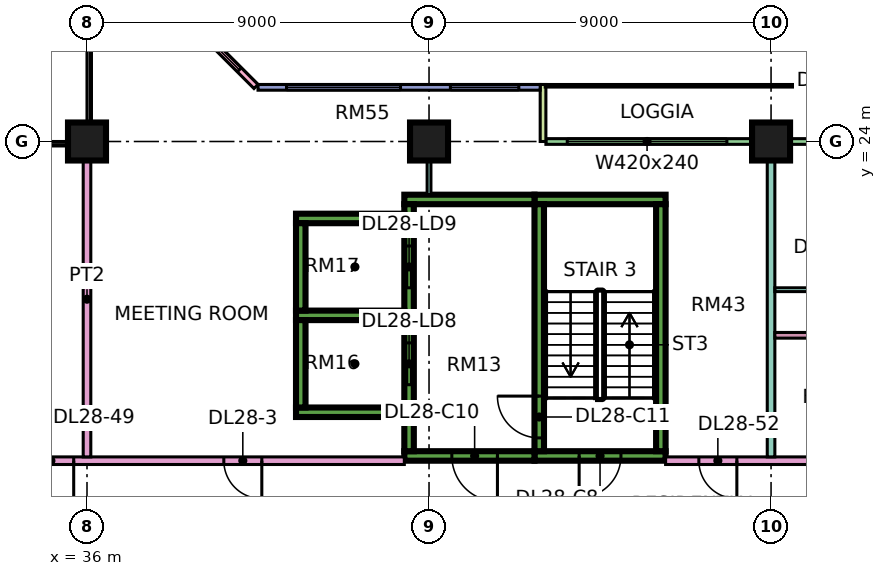
"""IFC4 building model, lengths in metres.
Left out: names, types, materials, properties, quantities, classifications, styles, units other than length and angle.
Written with IfcOpenShell. Run it as: python <this file> out.ifc"""

import sys

from ifc_helpers import new_model, si_unit, direction, frame, frame_2d, origin, origin_2d, place, context, subcontext, project, spatial, rectangle, extrude, element, fill, save


model = new_model("IFC4")
c1 = context("Model", 3, precision=1e-05, world=origin(), true_north=direction((0.0, 1.0)))
c2 = subcontext(c1, "Body", "Model", "MODEL_VIEW")
j1 = project(units=[si_unit("LENGTHUNIT", "METRE"), si_unit("PLANEANGLEUNIT", "RADIAN")], contexts=[c1])
p1 = place(None, origin())
s1 = spatial("IfcSite", under=j1, at=p1, CompositionType="ELEMENT")
p2 = place(p1, origin())
s2 = spatial("IfcBuilding", under=s1, at=p2, CompositionType="ELEMENT")
p3 = place(p2, frame((0.0, 0.0, 121.9)))
s3 = spatial("IfcBuildingStorey", under=s2, at=p3, CompositionType="ELEMENT", Elevation=121.9)
for number, where, z_axis, x_axis in (
    (1, (36.0, 24.0, 0.0), (0.0, 0.0, 1.0), (1.0, 0.0, 0.0)),
    (2, (45.0, 24.0, 0.0), (0.0, 0.0, 1.0), (1.0, 0.0, 0.0)),
    (3, (54.0, 24.0, 0.0), (0.0, 0.0, 1.0), (1.0, 0.0, 0.0)),
):
    element("IfcColumn", number, at=place(p3, frame(where, z_axis=z_axis, x_axis=x_axis)), inside=s3, PredefinedType="COLUMN", context=c2, shape_type="SweptSolid", body=[
        extrude(rectangle(XDim=1.0, YDim=1.0, at=origin_2d()), origin(), (0.0, 0.0, 1.0), 3.75),
    ])
p4 = place(p3, frame((47.775, 15.725, 0.0), z_axis=(0.0, 0.0, 1.0), x_axis=(1.0, 0.0, 0.0)))
e4 = element("IfcWall", 4, at=p4, inside=s3, PredefinedType="SHEAR", context=c2, shape_type="SweptSolid", body=[
    extrude(rectangle(XDim=3.45, YDim=0.25, at=frame_2d((1.725, 0.0))), origin(), (0.0, 0.0, 1.0), 3.75),
])
p5 = place(p4, frame((1.175, 0.0, 0.0)))
e5 = element("IfcOpeningElement", 5, at=p5, cuts=e4, PredefinedType="OPENING", context=c2, shape_type="SweptSolid", body=[
    extrude(rectangle(XDim=1.1, YDim=2.2, at=frame_2d((0.55, 1.1))), frame((0.0, 0.135, 0.0), z_axis=(0.0, -1.0, 0.0), x_axis=(1.0, 0.0, 0.0)), (0.0, 0.0, 1.0), 0.27),
])
p6 = place(p3, frame((47.775, 22.475, 0.0), z_axis=(0.0, 0.0, 1.0), x_axis=(1.0, 0.0, 0.0)))
e6 = element("IfcWall", 6, at=p6, inside=s3, PredefinedType="SHEAR", context=c2, shape_type="SweptSolid", body=[
    extrude(rectangle(XDim=3.45, YDim=0.25, at=frame_2d((1.725, 0.0))), origin(), (0.0, 0.0, 1.0), 3.75),
])
p7 = place(p3, frame((47.9, 15.85, 0.0), z_axis=(0.0, 0.0, 1.0), x_axis=(0.0, 1.0, 0.0)))
e7 = element("IfcWall", 7, at=p7, inside=s3, PredefinedType="SHEAR", context=c2, shape_type="SweptSolid", body=[
    extrude(rectangle(XDim=6.5, YDim=0.25, at=frame_2d((3.25, 0.0))), origin(), (0.0, 0.0, 1.0), 3.75),
])
p8 = place(p7, frame((0.35, 0.0, 0.0)))
e8 = element("IfcOpeningElement", 8, at=p8, cuts=e7, PredefinedType="OPENING", context=c2, shape_type="SweptSolid", body=[
    extrude(rectangle(XDim=1.1, YDim=2.2, at=frame_2d((0.55, 1.1))), frame((0.0, 0.135, 0.0), z_axis=(0.0, -1.0, 0.0), x_axis=(1.0, 0.0, 0.0)), (0.0, 0.0, 1.0), 0.27),
])
p9 = place(p3, frame((51.1, 15.85, 0.0), z_axis=(0.0, 0.0, 1.0), x_axis=(0.0, 1.0, 0.0)))
e9 = element("IfcWall", 9, at=p9, inside=s3, PredefinedType="SHEAR", context=c2, shape_type="SweptSolid", body=[
    extrude(rectangle(XDim=6.5, YDim=0.25, at=frame_2d((3.25, 0.0))), origin(), (0.0, 0.0, 1.0), 3.75),
])
p10 = place(p3, frame((44.35, 15.725, 0.0), z_axis=(0.0, 0.0, 1.0), x_axis=(1.0, 0.0, 0.0)))
e10 = element("IfcWall", 10, at=p10, inside=s3, PredefinedType="SHEAR", context=c2, shape_type="SweptSolid", body=[
    extrude(rectangle(XDim=3.425, YDim=0.25, at=frame_2d((1.712, 0.0))), origin(), (0.0, 0.0, 1.0), 3.75),
])
p11 = place(p10, frame((1.25, 0.0, 0.0)))
e11 = element("IfcOpeningElement", 11, at=p11, cuts=e10, PredefinedType="OPENING", context=c2, shape_type="SweptSolid", body=[
    extrude(rectangle(XDim=1.2, YDim=2.2, at=frame_2d((0.6, 1.1))), frame((0.0, 0.135, 0.0), z_axis=(0.0, -1.0, 0.0), x_axis=(1.0, 0.0, 0.0)), (0.0, 0.0, 1.0), 0.27),
])
p12 = place(p3, frame((44.35, 22.475, 0.0), z_axis=(0.0, 0.0, 1.0), x_axis=(1.0, 0.0, 0.0)))
e12 = element("IfcWall", 12, at=p12, inside=s3, PredefinedType="SHEAR", context=c2, shape_type="SweptSolid", body=[
    extrude(rectangle(XDim=3.425, YDim=0.25, at=frame_2d((1.712, 0.0))), origin(), (0.0, 0.0, 1.0), 3.75),
])
p13 = place(p3, frame((44.475, 15.85, 0.0), z_axis=(0.0, 0.0, 1.0), x_axis=(0.0, 1.0, 0.0)))
e13 = element("IfcWall", 13, at=p13, inside=s3, PredefinedType="SHEAR", context=c2, shape_type="SweptSolid", body=[
    extrude(rectangle(XDim=6.5, YDim=0.25, at=frame_2d((3.25, 0.0))), origin(), (0.0, 0.0, 1.0), 3.75),
])
p14 = place(p13, frame((1.75, 0.0, 0.0)))
e14 = element("IfcOpeningElement", 14, at=p14, cuts=e13, PredefinedType="OPENING", context=c2, shape_type="SweptSolid", body=[
    extrude(rectangle(XDim=1.1, YDim=2.2, at=frame_2d((0.55, 1.1))), frame((0.0, 0.135, 0.0), z_axis=(0.0, -1.0, 0.0), x_axis=(1.0, 0.0, 0.0)), (0.0, 0.0, 1.0), 0.27),
])
p15 = place(p13, frame((4.3, 0.0, 0.0)))
e15 = element("IfcOpeningElement", 15, at=p15, cuts=e13, PredefinedType="OPENING", context=c2, shape_type="SweptSolid", body=[
    extrude(rectangle(XDim=1.1, YDim=2.2, at=frame_2d((0.55, 1.1))), frame((0.0, 0.135, 0.0), z_axis=(0.0, -1.0, 0.0), x_axis=(1.0, 0.0, 0.0)), (0.0, 0.0, 1.0), 0.27),
])
for number, where, z_axis, x_axis in (
    (16, (41.5, 16.875, 0.0), (0.0, 0.0, 1.0), (1.0, 0.0, 0.0)),
    (17, (41.5, 19.425, 0.0), (0.0, 0.0, 1.0), (1.0, 0.0, 0.0)),
    (18, (41.5, 21.975, 0.0), (0.0, 0.0, 1.0), (1.0, 0.0, 0.0)),
):
    element("IfcWall", number, at=place(p3, frame(where, z_axis=z_axis, x_axis=x_axis)), inside=s3, PredefinedType="SHEAR", context=c2, shape_type="SweptSolid", body=[
        extrude(rectangle(XDim=2.85, YDim=0.25, at=frame_2d((1.425, 0.0))), origin(), (0.0, 0.0, 1.0), 3.75),
    ])
for number, where, z_axis, x_axis in (
    (19, (41.625, 17.0, 0.0), (0.0, 0.0, 1.0), (0.0, 1.0, 0.0)),
    (20, (41.625, 19.55, 0.0), (0.0, 0.0, 1.0), (0.0, 1.0, 0.0)),
):
    element("IfcWall", number, at=place(p3, frame(where, z_axis=z_axis, x_axis=x_axis)), inside=s3, PredefinedType="SHEAR", context=c2, shape_type="SweptSolid", body=[
        extrude(rectangle(XDim=2.3, YDim=0.25, at=frame_2d((1.15, 0.0))), origin(), (0.0, 0.0, 1.0), 3.75),
    ])
p16 = place(p3, frame((59.925, 24.0, 0.0), z_axis=(0.0, 0.0, 1.0), x_axis=(-1.0, 0.0, 0.0)))
e21 = element("IfcWall", 21, at=p16, inside=s3, PredefinedType="SOLIDWALL", context=c2, shape_type="SweptSolid", body=[
    extrude(rectangle(XDim=11.85, YDim=0.15, at=frame_2d((5.925, 0.0))), origin(), (0.0, 0.0, 1.0), 3.35),
])
p17 = place(p16, frame((0.562, 0.0, 0.45)))
e22 = element("IfcOpeningElement", 22, at=p17, cuts=e21, PredefinedType="OPENING", context=c2, shape_type="SweptSolid", body=[
    extrude(rectangle(XDim=1.8, YDim=2.4, at=frame_2d((0.9, 1.2))), frame((0.0, 0.085, 0.0), z_axis=(0.0, -1.0, 0.0), x_axis=(1.0, 0.0, 0.0)), (0.0, 0.0, 1.0), 0.17),
])
p18 = place(p16, frame((3.525, 0.0, 0.0)))
e23 = element("IfcOpeningElement", 23, at=p18, cuts=e21, PredefinedType="OPENING", context=c2, shape_type="SweptSolid", body=[
    extrude(rectangle(XDim=1.2, YDim=2.4, at=frame_2d((0.6, 1.2))), frame((0.0, 0.085, 0.0), z_axis=(0.0, -1.0, 0.0), x_axis=(1.0, 0.0, 0.0)), (0.0, 0.0, 1.0), 0.17),
])
p19 = place(p16, frame((7.087, 0.0, 0.45)))
e24 = element("IfcOpeningElement", 24, at=p19, cuts=e21, PredefinedType="OPENING", context=c2, shape_type="SweptSolid", body=[
    extrude(rectangle(XDim=4.2, YDim=2.4, at=frame_2d((2.1, 1.2))), frame((0.0, 0.085, 0.0), z_axis=(0.0, -1.0, 0.0), x_axis=(1.0, 0.0, 0.0)), (0.0, 0.0, 1.0), 0.17),
])
p20 = place(p3, frame((48.0, 25.5, 0.0), z_axis=(0.0, 0.0, 1.0), x_axis=(0.0, -1.0, 0.0)))
e25 = element("IfcWall", 25, at=p20, inside=s3, PredefinedType="SOLIDWALL", context=c2, shape_type="SweptSolid", body=[
    extrude(rectangle(XDim=1.5, YDim=0.15, at=frame_2d((0.75, 0.0))), origin(), (0.0, 0.0, 1.0), 3.35),
])
p21 = place(p3, frame((47.925, 25.425, 0.0), z_axis=(0.0, 0.0, 1.0), x_axis=(-1.0, 0.0, 0.0)))
e26 = element("IfcWall", 26, at=p21, inside=s3, PredefinedType="SOLIDWALL", context=c2, shape_type="SweptSolid", body=[
    extrude(rectangle(XDim=7.425, YDim=0.15, at=frame_2d((3.712, 0.0))), origin(), (0.0, 0.0, 1.0), 3.35),
])
p22 = place(p21, frame((0.562, 0.0, 0.45)))
e27 = element("IfcOpeningElement", 27, at=p22, cuts=e26, PredefinedType="OPENING", context=c2, shape_type="SweptSolid", body=[
    extrude(rectangle(XDim=1.8, YDim=2.4, at=frame_2d((0.9, 1.2))), frame((0.0, 0.085, 0.0), z_axis=(0.0, -1.0, 0.0), x_axis=(1.0, 0.0, 0.0)), (0.0, 0.0, 1.0), 0.17),
])
p23 = place(p21, frame((3.675, 0.0, 0.45)))
e28 = element("IfcOpeningElement", 28, at=p23, cuts=e26, PredefinedType="OPENING", context=c2, shape_type="SweptSolid", body=[
    extrude(rectangle(XDim=3.0, YDim=2.4, at=frame_2d((1.5, 1.2))), frame((0.0, 0.085, 0.0), z_axis=(0.0, -1.0, 0.0), x_axis=(1.0, 0.0, 0.0)), (0.0, 0.0, 1.0), 0.17),
])
p24 = place(p3, frame((40.447, 25.447, 0.0), z_axis=(0.0, 0.0, 1.0), x_axis=(-0.707106781187, 0.707106781187, 0.0)))
e29 = element("IfcWall", 29, at=p24, inside=s3, PredefinedType="SOLIDWALL", context=c2, shape_type="SweptSolid", body=[
    extrude(rectangle(XDim=4.243, YDim=0.15, at=frame_2d((2.121, 0.0))), origin(), (0.0, 0.0, 1.0), 3.35),
])
p25 = place(p24, frame((0.621, 0.0, 0.45)))
e30 = element("IfcOpeningElement", 30, at=p25, cuts=e29, PredefinedType="OPENING", context=c2, shape_type="SweptSolid", body=[
    extrude(rectangle(XDim=3.0, YDim=2.4, at=frame_2d((1.5, 1.2))), frame((0.0, 0.085, 0.0), z_axis=(0.0, -1.0, 0.0), x_axis=(1.0, 0.0, 0.0)), (0.0, 0.0, 1.0), 0.17),
])
p26 = place(p3, frame((34.0, 15.6, 0.0), z_axis=(0.0, 0.0, 1.0), x_axis=(1.0, 0.0, 0.0)))
e31 = element("IfcWall", 31, at=p26, inside=s3, PredefinedType="PARTITIONING", context=c2, shape_type="SweptSolid", body=[
    extrude(rectangle(XDim=10.35, YDim=0.2, at=frame_2d((5.175, 0.0))), origin(), (0.0, 0.0, 1.0), 3.35),
])
p27 = place(p26, frame((5.6, 0.0, 0.0)))
e32 = element("IfcOpeningElement", 32, at=p27, cuts=e31, PredefinedType="OPENING", context=c2, shape_type="SweptSolid", body=[
    extrude(rectangle(XDim=1.0, YDim=2.1, at=frame_2d((0.5, 1.05))), frame((0.0, 0.11, 0.0), z_axis=(0.0, -1.0, 0.0), x_axis=(1.0, 0.0, 0.0)), (0.0, 0.0, 1.0), 0.22),
])
p28 = place(p26, frame((0.45, 0.0, 0.0)))
e33 = element("IfcOpeningElement", 33, at=p28, cuts=e31, PredefinedType="OPENING", context=c2, shape_type="SweptSolid", body=[
    extrude(rectangle(XDim=1.2, YDim=2.1, at=frame_2d((0.6, 1.05))), frame((0.0, 0.11, 0.0), z_axis=(0.0, -1.0, 0.0), x_axis=(1.0, 0.0, 0.0)), (0.0, 0.0, 1.0), 0.22),
])
p29 = place(p3, frame((36.0, 15.7, 0.0), z_axis=(0.0, 0.0, 1.0), x_axis=(0.0, 1.0, 0.0)))
e34 = element("IfcWall", 34, at=p29, inside=s3, PredefinedType="PARTITIONING", context=c2, shape_type="SweptSolid", body=[
    extrude(rectangle(XDim=8.3, YDim=0.2, at=frame_2d((4.15, 0.0))), origin(), (0.0, 0.0, 1.0), 3.35),
])
p30 = place(p3, frame((45.0, 22.6, 0.0), z_axis=(0.0, 0.0, 1.0), x_axis=(0.0, 1.0, 0.0)))
e35 = element("IfcWall", 35, at=p30, inside=s3, PredefinedType="PARTITIONING", context=c2, shape_type="SweptSolid", body=[
    extrude(rectangle(XDim=1.4, YDim=0.1, at=frame_2d((0.7, 0.0))), origin(), (0.0, 0.0, 1.0), 3.35),
])
p31 = place(p3, frame((51.225, 15.6, 0.0), z_axis=(0.0, 0.0, 1.0), x_axis=(1.0, 0.0, 0.0)))
e36 = element("IfcWall", 36, at=p31, inside=s3, PredefinedType="PARTITIONING", context=c2, shape_type="SweptSolid", body=[
    extrude(rectangle(XDim=22.125, YDim=0.2, at=frame_2d((11.062, 0.0))), origin(), (0.0, 0.0, 1.0), 3.35),
])
p32 = place(p31, frame((18.725, 0.0, 0.0)))
e37 = element("IfcOpeningElement", 37, at=p32, cuts=e36, PredefinedType="OPENING", context=c2, shape_type="SweptSolid", body=[
    extrude(rectangle(XDim=1.0, YDim=2.1, at=frame_2d((0.5, 1.05))), frame((0.0, 0.11, 0.0), z_axis=(0.0, -1.0, 0.0), x_axis=(1.0, 0.0, 0.0)), (0.0, 0.0, 1.0), 0.22),
])
p33 = place(p31, frame((0.875, 0.0, 0.0)))
e38 = element("IfcOpeningElement", 38, at=p33, cuts=e36, PredefinedType="OPENING", context=c2, shape_type="SweptSolid", body=[
    extrude(rectangle(XDim=1.0, YDim=2.1, at=frame_2d((0.5, 1.05))), frame((0.0, 0.11, 0.0), z_axis=(0.0, -1.0, 0.0), x_axis=(1.0, 0.0, 0.0)), (0.0, 0.0, 1.0), 0.22),
])
p34 = place(p3, frame((54.0, 15.7, 0.0), z_axis=(0.0, 0.0, 1.0), x_axis=(0.0, 1.0, 0.0)))
e39 = element("IfcWall", 39, at=p34, inside=s3, PredefinedType="PARTITIONING", context=c2, shape_type="SweptSolid", body=[
    extrude(rectangle(XDim=8.226, YDim=0.2, at=frame_2d((4.113, 0.0))), origin(), (0.0, 0.0, 1.0), 3.35),
])
p35 = place(p3, frame((54.1, 18.9, 0.0), z_axis=(0.0, 0.0, 1.0), x_axis=(1.0, 0.0, 0.0)))
e40 = element("IfcWall", 40, at=p35, inside=s3, PredefinedType="PARTITIONING", context=c2, shape_type="SweptSolid", body=[
    extrude(rectangle(XDim=14.975, YDim=0.15, at=frame_2d((7.487, 0.0))), origin(), (0.0, 0.0, 1.0), 3.35),
])
p36 = place(p35, frame((2.3, 0.0, 0.0)))
e41 = element("IfcOpeningElement", 41, at=p36, cuts=e40, PredefinedType="OPENING", context=c2, shape_type="SweptSolid", body=[
    extrude(rectangle(XDim=0.9, YDim=2.1, at=frame_2d((0.45, 1.05))), frame((0.0, 0.085, 0.0), z_axis=(0.0, -1.0, 0.0), x_axis=(1.0, 0.0, 0.0)), (0.0, 0.0, 1.0), 0.17),
])
p37 = place(p35, frame((7.1, 0.0, 0.0)))
e42 = element("IfcOpeningElement", 42, at=p37, cuts=e40, PredefinedType="OPENING", context=c2, shape_type="SweptSolid", body=[
    extrude(rectangle(XDim=0.8, YDim=2.1, at=frame_2d((0.4, 1.05))), frame((0.0, 0.085, 0.0), z_axis=(0.0, -1.0, 0.0), x_axis=(1.0, 0.0, 0.0)), (0.0, 0.0, 1.0), 0.17),
])
p38 = place(p35, frame((10.55, 0.0, 0.0)))
e43 = element("IfcOpeningElement", 43, at=p38, cuts=e40, PredefinedType="OPENING", context=c2, shape_type="SweptSolid", body=[
    extrude(rectangle(XDim=0.8, YDim=2.1, at=frame_2d((0.4, 1.05))), frame((0.0, 0.085, 0.0), z_axis=(0.0, -1.0, 0.0), x_axis=(1.0, 0.0, 0.0)), (0.0, 0.0, 1.0), 0.17),
])
p39 = place(p3, frame((54.1, 20.1, 0.0), z_axis=(0.0, 0.0, 1.0), x_axis=(1.0, 0.0, 0.0)))
e44 = element("IfcWall", 44, at=p39, inside=s3, PredefinedType="PARTITIONING", context=c2, shape_type="SweptSolid", body=[
    extrude(rectangle(XDim=11.95, YDim=0.1, at=frame_2d((5.975, 0.0))), origin(), (0.0, 0.0, 1.0), 3.35),
])
p40 = place(p39, frame((0.95, 0.0, 0.0)))
e45 = element("IfcOpeningElement", 45, at=p40, cuts=e44, PredefinedType="OPENING", context=c2, shape_type="SweptSolid", body=[
    extrude(rectangle(XDim=0.9, YDim=2.1, at=frame_2d((0.45, 1.05))), frame((0.0, 0.06, 0.0), z_axis=(0.0, -1.0, 0.0), x_axis=(1.0, 0.0, 0.0)), (0.0, 0.0, 1.0), 0.12),
])
p41 = place(p39, frame((3.95, 0.0, 0.0)))
e46 = element("IfcOpeningElement", 46, at=p41, cuts=e44, PredefinedType="OPENING", context=c2, shape_type="SweptSolid", body=[
    extrude(rectangle(XDim=0.9, YDim=2.1, at=frame_2d((0.45, 1.05))), frame((0.0, 0.06, 0.0), z_axis=(0.0, -1.0, 0.0), x_axis=(1.0, 0.0, 0.0)), (0.0, 0.0, 1.0), 0.12),
])
p42 = place(p39, frame((6.55, 0.0, 0.0)))
e47 = element("IfcOpeningElement", 47, at=p42, cuts=e44, PredefinedType="OPENING", context=c2, shape_type="SweptSolid", body=[
    extrude(rectangle(XDim=1.6, YDim=2.1, at=frame_2d((0.8, 1.05))), frame((0.0, 0.06, 0.0), z_axis=(0.0, -1.0, 0.0), x_axis=(1.0, 0.0, 0.0)), (0.0, 0.0, 1.0), 0.12),
])
p43 = place(p39, frame((9.95, 0.0, 0.0)))
e48 = element("IfcOpeningElement", 48, at=p43, cuts=e44, PredefinedType="OPENING", context=c2, shape_type="SweptSolid", body=[
    extrude(rectangle(XDim=0.9, YDim=2.1, at=frame_2d((0.45, 1.05))), frame((0.0, 0.06, 0.0), z_axis=(0.0, -1.0, 0.0), x_axis=(1.0, 0.0, 0.0)), (0.0, 0.0, 1.0), 0.12),
])
p44 = place(p19, origin())
e49 = element("IfcWindow", 49, at=p44, inside=s3, PartitioningType="SINGLE_PANEL", PredefinedType="WINDOW", context=c2, shape_type="SweptSolid", body=[
    extrude(rectangle(XDim=4.2, YDim=2.4, at=frame_2d((2.1, 1.2))), frame((0.0, 0.03, 0.0), z_axis=(0.0, -1.0, 0.0), x_axis=(1.0, 0.0, 0.0)), (0.0, 0.0, 1.0), 0.06),
])
fill(e24, e49)
p45 = place(p22, origin())
e50 = element("IfcWindow", 50, at=p45, inside=s3, PartitioningType="SINGLE_PANEL", PredefinedType="WINDOW", context=c2, shape_type="SweptSolid", body=[
    extrude(rectangle(XDim=1.8, YDim=2.4, at=frame_2d((0.9, 1.2))), frame((0.0, 0.03, 0.0), z_axis=(0.0, -1.0, 0.0), x_axis=(1.0, 0.0, 0.0)), (0.0, 0.0, 1.0), 0.06),
])
fill(e27, e50)
p46 = place(p23, origin())
e51 = element("IfcWindow", 51, at=p46, inside=s3, PartitioningType="SINGLE_PANEL", PredefinedType="WINDOW", context=c2, shape_type="SweptSolid", body=[
    extrude(rectangle(XDim=3.0, YDim=2.4, at=frame_2d((1.5, 1.2))), frame((0.0, 0.03, 0.0), z_axis=(0.0, -1.0, 0.0), x_axis=(1.0, 0.0, 0.0)), (0.0, 0.0, 1.0), 0.06),
])
fill(e28, e51)
p47 = place(p25, origin())
e52 = element("IfcWindow", 52, at=p47, inside=s3, PartitioningType="SINGLE_PANEL", PredefinedType="WINDOW", context=c2, shape_type="SweptSolid", body=[
    extrude(rectangle(XDim=3.0, YDim=2.4, at=frame_2d((1.5, 1.2))), frame((0.0, 0.03, 0.0), z_axis=(0.0, -1.0, 0.0), x_axis=(1.0, 0.0, 0.0)), (0.0, 0.0, 1.0), 0.06),
])
fill(e30, e52)
p48 = place(p5, frame((1.1, 0.0, 0.0), z_axis=(0.0, 0.0, 1.0), x_axis=(-1.0, 0.0, 0.0)))
e53 = element("IfcDoor", 53, at=p48, inside=s3, OperationType="SINGLE_SWING_LEFT", PredefinedType="DOOR", context=c2, shape_type="SweptSolid", body=[
    extrude(rectangle(XDim=1.1, YDim=2.2, at=frame_2d((0.55, 1.1))), frame((0.0, 0.025, 0.0), z_axis=(0.0, -1.0, 0.0), x_axis=(1.0, 0.0, 0.0)), (0.0, 0.0, 1.0), 0.05),
])
fill(e5, e53)
p49 = place(p11, origin())
e54 = element("IfcDoor", 54, at=p49, inside=s3, OperationType="SINGLE_SWING_RIGHT", PredefinedType="DOOR", context=c2, shape_type="SweptSolid", body=[
    extrude(rectangle(XDim=1.2, YDim=2.2, at=frame_2d((0.6, 1.1))), frame((0.0, 0.025, 0.0), z_axis=(0.0, -1.0, 0.0), x_axis=(1.0, 0.0, 0.0)), (0.0, 0.0, 1.0), 0.05),
])
fill(e11, e54)
p50 = place(p8, frame((1.1, 0.0, 0.0), z_axis=(0.0, 0.0, 1.0), x_axis=(-1.0, 0.0, 0.0)))
e55 = element("IfcDoor", 55, at=p50, inside=s3, OperationType="SINGLE_SWING_RIGHT", PredefinedType="DOOR", context=c2, shape_type="SweptSolid", body=[
    extrude(rectangle(XDim=1.1, YDim=2.2, at=frame_2d((0.55, 1.1))), frame((0.0, 0.025, 0.0), z_axis=(0.0, -1.0, 0.0), x_axis=(1.0, 0.0, 0.0)), (0.0, 0.0, 1.0), 0.05),
])
fill(e8, e55)
p51 = place(p14, origin())
e56 = element("IfcDoor", 56, at=p51, inside=s3, OperationType="DOUBLE_DOOR_SLIDING", PredefinedType="DOOR", context=c2, shape_type="SweptSolid", body=[
    extrude(rectangle(XDim=1.1, YDim=2.2, at=frame_2d((0.55, 1.1))), frame((0.0, 0.025, 0.0), z_axis=(0.0, -1.0, 0.0), x_axis=(1.0, 0.0, 0.0)), (0.0, 0.0, 1.0), 0.05),
])
fill(e14, e56)
p52 = place(p15, origin())
e57 = element("IfcDoor", 57, at=p52, inside=s3, OperationType="DOUBLE_DOOR_SLIDING", PredefinedType="DOOR", context=c2, shape_type="SweptSolid", body=[
    extrude(rectangle(XDim=1.1, YDim=2.2, at=frame_2d((0.55, 1.1))), frame((0.0, 0.025, 0.0), z_axis=(0.0, -1.0, 0.0), x_axis=(1.0, 0.0, 0.0)), (0.0, 0.0, 1.0), 0.05),
])
fill(e15, e57)
p53 = place(p27, origin())
e58 = element("IfcDoor", 58, at=p53, inside=s3, OperationType="SINGLE_SWING_RIGHT", PredefinedType="DOOR", context=c2, shape_type="SweptSolid", body=[
    extrude(rectangle(XDim=1.0, YDim=2.1, at=frame_2d((0.5, 1.05))), frame((0.0, 0.025, 0.0), z_axis=(0.0, -1.0, 0.0), x_axis=(1.0, 0.0, 0.0)), (0.0, 0.0, 1.0), 0.05),
])
fill(e32, e58)
p54 = place(p28, origin())
e59 = element("IfcDoor", 59, at=p54, inside=s3, OperationType="SINGLE_SWING_RIGHT", PredefinedType="DOOR", context=c2, shape_type="SweptSolid", body=[
    extrude(rectangle(XDim=1.2, YDim=2.1, at=frame_2d((0.6, 1.05))), frame((0.0, 0.025, 0.0), z_axis=(0.0, -1.0, 0.0), x_axis=(1.0, 0.0, 0.0)), (0.0, 0.0, 1.0), 0.05),
])
fill(e33, e59)
p55 = place(p33, origin())
e60 = element("IfcDoor", 60, at=p55, inside=s3, OperationType="SINGLE_SWING_RIGHT", PredefinedType="DOOR", context=c2, shape_type="SweptSolid", body=[
    extrude(rectangle(XDim=1.0, YDim=2.1, at=frame_2d((0.5, 1.05))), frame((0.0, 0.025, 0.0), z_axis=(0.0, -1.0, 0.0), x_axis=(1.0, 0.0, 0.0)), (0.0, 0.0, 1.0), 0.05),
])
fill(e38, e60)
save(model, sys.argv[1])
